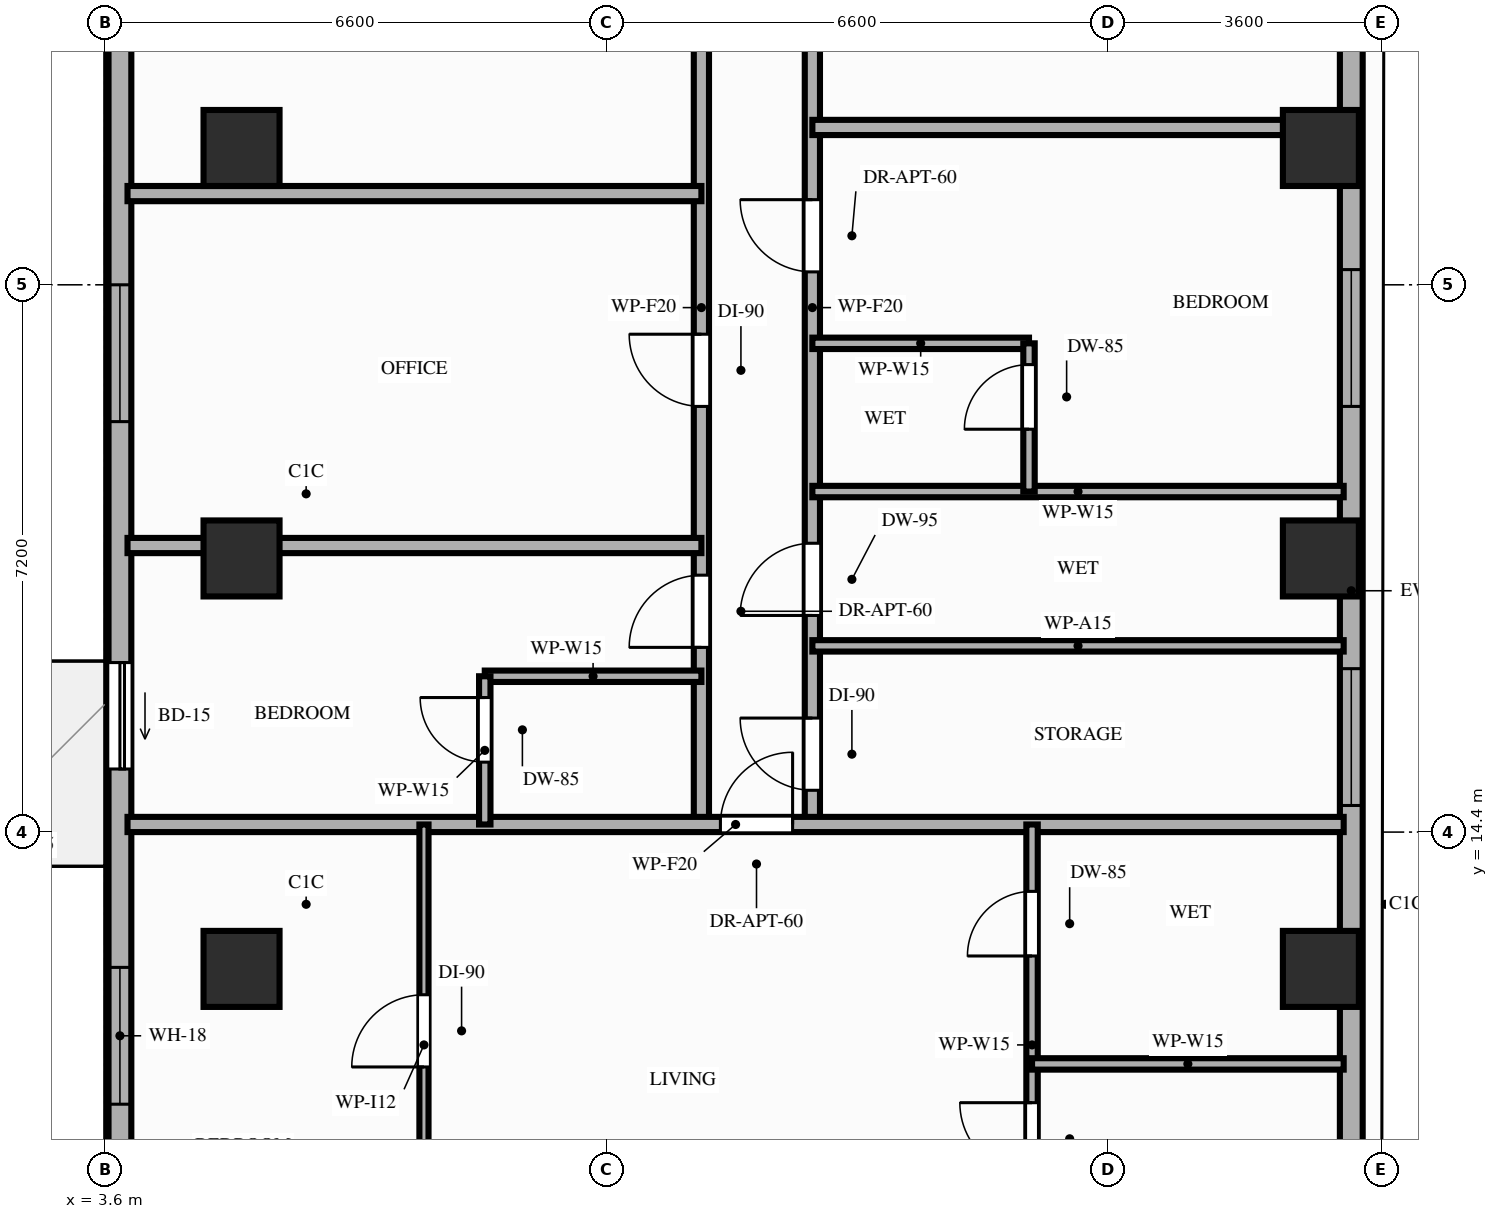
"""IFC4 building model, lengths in metres.
Left out: names, types, materials, properties, quantities, classifications, styles, units other than length and angle.
Written with IfcOpenShell. Run it as: python <this file> out.ifc"""

import sys

from ifc_helpers import new_model, si_unit, direction, frame, frame_2d, origin, origin_2d, place, context, subcontext, project, spatial, rectangle, extrude, element, fill, save


model = new_model("IFC4")
c1 = context("Model", 3, precision=1e-05, world=origin(), true_north=direction((0.0, 1.0)))
c2 = subcontext(c1, "Body", "Model", "MODEL_VIEW")
j1 = project(units=[si_unit("LENGTHUNIT", "METRE"), si_unit("PLANEANGLEUNIT", "RADIAN")], contexts=[c1])
p1 = place(None, origin())
s1 = spatial("IfcSite", under=j1, at=p1, CompositionType="ELEMENT")
p2 = place(p1, origin())
s2 = spatial("IfcBuilding", under=s1, at=p2, CompositionType="ELEMENT")
p3 = place(p2, frame((0.0, 0.0, 107.4)))
s3 = spatial("IfcBuildingStorey", under=s2, at=p3, CompositionType="ELEMENT", Elevation=107.4)
for number, where, z_axis, x_axis in (
    (1, (5.4, 12.6, 0.0), (0.0, 0.0, 1.0), (1.0, 0.0, 0.0)),
    (2, (19.6, 12.6, 0.0), (0.0, 0.0, 1.0), (1.0, 0.0, 0.0)),
    (3, (5.4, 18.0, 0.0), (0.0, 0.0, 1.0), (1.0, 0.0, 0.0)),
    (4, (19.6, 18.0, 0.0), (0.0, 0.0, 1.0), (1.0, 0.0, 0.0)),
    (5, (5.4, 23.4, 0.0), (0.0, 0.0, 1.0), (1.0, 0.0, 0.0)),
    (6, (19.6, 23.4, 0.0), (0.0, 0.0, 1.0), (1.0, 0.0, 0.0)),
):
    element("IfcColumn", number, at=place(p3, frame(where, z_axis=z_axis, x_axis=x_axis)), inside=s3, PredefinedType="COLUMN", context=c2, shape_type="SweptSolid", body=[
        extrude(rectangle(XDim=1.0, YDim=1.0, at=origin_2d()), origin(), (0.0, 0.0, 1.0), 3.2),
    ])
p4 = place(p3, frame((3.8, 42.1, 0.0), z_axis=(0.0, 0.0, 1.0), x_axis=(0.0, -1.0, 0.0)))
e7 = element("IfcWall", 7, at=p4, inside=s3, PredefinedType="STANDARD", context=c2, shape_type="SweptSolid", body=[
    extrude(rectangle(XDim=33.3, YDim=0.3, at=frame_2d((16.65, 0.0))), origin(), (0.0, 0.0, 1.0), 2.71),
])
p5 = place(p4, frame((25.47, 0.0, 0.0)))
e8 = element("IfcOpeningElement", 8, at=p5, cuts=e7, PredefinedType="OPENING", context=c2, shape_type="SweptSolid", body=[
    extrude(rectangle(XDim=1.4, YDim=2.1, at=frame_2d((0.7, 1.05))), frame((0.0, 0.16, 0.0), z_axis=(0.0, -1.0, 0.0), x_axis=(1.0, 0.0, 0.0)), (0.0, 0.0, 1.0), 0.32),
])
p6 = place(p4, frame((15.3, 0.0, 0.0)))
e9 = element("IfcOpeningElement", 9, at=p6, cuts=e7, PredefinedType="OPENING", context=c2, shape_type="SweptSolid", body=[
    extrude(rectangle(XDim=1.4, YDim=2.1, at=frame_2d((0.7, 1.05))), frame((0.0, 0.16, 0.0), z_axis=(0.0, -1.0, 0.0), x_axis=(1.0, 0.0, 0.0)), (0.0, 0.0, 1.0), 0.32),
])
p7 = place(p4, frame((29.48, 0.0, 0.85)))
e10 = element("IfcOpeningElement", 10, at=p7, cuts=e7, PredefinedType="OPENING", context=c2, shape_type="SweptSolid", body=[
    extrude(rectangle(XDim=1.8, YDim=1.61, at=frame_2d((0.9, 0.805))), frame((0.0, 0.16, 0.0), z_axis=(0.0, -1.0, 0.0), x_axis=(1.0, 0.0, 0.0)), (0.0, 0.0, 1.0), 0.32),
])
p8 = place(p4, frame((20.5, 0.0, 0.85)))
e11 = element("IfcOpeningElement", 11, at=p8, cuts=e7, PredefinedType="OPENING", context=c2, shape_type="SweptSolid", body=[
    extrude(rectangle(XDim=1.8, YDim=1.61, at=frame_2d((0.9, 0.805))), frame((0.0, 0.16, 0.0), z_axis=(0.0, -1.0, 0.0), x_axis=(1.0, 0.0, 0.0)), (0.0, 0.0, 1.0), 0.32),
])
p9 = place(p4, frame((9.9, 0.0, 0.85)))
e12 = element("IfcOpeningElement", 12, at=p9, cuts=e7, PredefinedType="OPENING", context=c2, shape_type="SweptSolid", body=[
    extrude(rectangle(XDim=1.8, YDim=1.61, at=frame_2d((0.9, 0.805))), frame((0.0, 0.16, 0.0), z_axis=(0.0, -1.0, 0.0), x_axis=(1.0, 0.0, 0.0)), (0.0, 0.0, 1.0), 0.32),
])
p10 = place(p4, frame((3.8, 0.0, 0.85)))
e13 = element("IfcOpeningElement", 13, at=p10, cuts=e7, PredefinedType="OPENING", context=c2, shape_type="SweptSolid", body=[
    extrude(rectangle(XDim=1.8, YDim=1.61, at=frame_2d((0.9, 0.805))), frame((0.0, 0.16, 0.0), z_axis=(0.0, -1.0, 0.0), x_axis=(1.0, 0.0, 0.0)), (0.0, 0.0, 1.0), 0.32),
])
p11 = place(p3, frame((20.0, 8.8, 0.0), z_axis=(0.0, 0.0, 1.0), x_axis=(0.0, 1.0, 0.0)))
e14 = element("IfcWall", 14, at=p11, inside=s3, PredefinedType="STANDARD", context=c2, shape_type="SweptSolid", body=[
    extrude(rectangle(XDim=17.55, YDim=0.3, at=frame_2d((8.775, 0.0))), origin(), (0.0, 0.0, 1.0), 2.41),
])
p12 = place(p11, frame((11.2, 0.0, 0.85)))
e15 = element("IfcOpeningElement", 15, at=p12, cuts=e14, PredefinedType="OPENING", context=c2, shape_type="SweptSolid", body=[
    extrude(rectangle(XDim=1.8, YDim=1.31, at=frame_2d((0.9, 0.655))), frame((0.0, 0.16, 0.0), z_axis=(0.0, -1.0, 0.0), x_axis=(1.0, 0.0, 0.0)), (0.0, 0.0, 1.0), 0.32),
])
p13 = place(p11, frame((5.95, 0.0, 0.85)))
e16 = element("IfcOpeningElement", 16, at=p13, cuts=e14, PredefinedType="OPENING", context=c2, shape_type="SweptSolid", body=[
    extrude(rectangle(XDim=1.8, YDim=1.31, at=frame_2d((0.9, 0.655))), frame((0.0, 0.16, 0.0), z_axis=(0.0, -1.0, 0.0), x_axis=(1.0, 0.0, 0.0)), (0.0, 0.0, 1.0), 0.32),
])
p14 = place(p3, frame((11.45, 14.5, 0.0), z_axis=(0.0, 0.0, 1.0), x_axis=(0.0, 1.0, 0.0)))
e17 = element("IfcWall", 17, at=p14, inside=s3, PredefinedType="PARTITIONING", context=c2, shape_type="SweptSolid", body=[
    extrude(rectangle(XDim=13.6, YDim=0.2, at=frame_2d((6.8, 0.0))), origin(), (0.0, 0.0, 1.0), 2.41),
])
p15 = place(p14, frame((2.33, 0.0, 0.0)))
e18 = element("IfcOpeningElement", 18, at=p15, cuts=e17, PredefinedType="OPENING", context=c2, shape_type="SweptSolid", body=[
    extrude(rectangle(XDim=0.95, YDim=2.15, at=frame_2d((0.475, 1.075))), frame((0.0, 0.11, 0.0), z_axis=(0.0, -1.0, 0.0), x_axis=(1.0, 0.0, 0.0)), (0.0, 0.0, 1.0), 0.22),
])
p16 = place(p14, frame((5.5, 0.0, 0.0)))
e19 = element("IfcOpeningElement", 19, at=p16, cuts=e17, PredefinedType="OPENING", context=c2, shape_type="SweptSolid", body=[
    extrude(rectangle(XDim=0.95, YDim=2.15, at=frame_2d((0.475, 1.075))), frame((0.0, 0.11, 0.0), z_axis=(0.0, -1.0, 0.0), x_axis=(1.0, 0.0, 0.0)), (0.0, 0.0, 1.0), 0.22),
])
p17 = place(p14, frame((10.47, 0.0, 0.0)))
e20 = element("IfcOpeningElement", 20, at=p17, cuts=e17, PredefinedType="OPENING", context=c2, shape_type="SweptSolid", body=[
    extrude(rectangle(XDim=0.95, YDim=2.15, at=frame_2d((0.475, 1.075))), frame((0.0, 0.11, 0.0), z_axis=(0.0, -1.0, 0.0), x_axis=(1.0, 0.0, 0.0)), (0.0, 0.0, 1.0), 0.22),
])
p18 = place(p3, frame((12.91, 14.5, 0.0), z_axis=(0.0, 0.0, 1.0), x_axis=(0.0, 1.0, 0.0)))
e21 = element("IfcWall", 21, at=p18, inside=s3, PredefinedType="PARTITIONING", context=c2, shape_type="SweptSolid", body=[
    extrude(rectangle(XDim=13.6, YDim=0.2, at=frame_2d((6.8, 0.0))), origin(), (0.0, 0.0, 1.0), 2.41),
])
p19 = place(p18, frame((0.45, 0.0, 0.0)))
e22 = element("IfcOpeningElement", 22, at=p19, cuts=e21, PredefinedType="OPENING", context=c2, shape_type="SweptSolid", body=[
    extrude(rectangle(XDim=0.95, YDim=2.15, at=frame_2d((0.475, 1.075))), frame((0.0, 0.11, 0.0), z_axis=(0.0, -1.0, 0.0), x_axis=(1.0, 0.0, 0.0)), (0.0, 0.0, 1.0), 0.22),
])
p20 = place(p18, frame((2.75, 0.0, 0.0)))
e23 = element("IfcOpeningElement", 23, at=p20, cuts=e21, PredefinedType="OPENING", context=c2, shape_type="SweptSolid", body=[
    extrude(rectangle(XDim=0.95, YDim=2.1, at=frame_2d((0.475, 1.05))), frame((0.0, 0.11, 0.0), z_axis=(0.0, -1.0, 0.0), x_axis=(1.0, 0.0, 0.0)), (0.0, 0.0, 1.0), 0.22),
])
p21 = place(p18, frame((10.91, 0.0, 0.0)))
e24 = element("IfcOpeningElement", 24, at=p21, cuts=e21, PredefinedType="OPENING", context=c2, shape_type="SweptSolid", body=[
    extrude(rectangle(XDim=0.95, YDim=2.15, at=frame_2d((0.475, 1.075))), frame((0.0, 0.11, 0.0), z_axis=(0.0, -1.0, 0.0), x_axis=(1.0, 0.0, 0.0)), (0.0, 0.0, 1.0), 0.22),
])
p22 = place(p18, frame((7.27, 0.0, 0.0)))
e25 = element("IfcOpeningElement", 25, at=p22, cuts=e21, PredefinedType="OPENING", context=c2, shape_type="SweptSolid", body=[
    extrude(rectangle(XDim=0.95, YDim=2.15, at=frame_2d((0.475, 1.075))), frame((0.0, 0.11, 0.0), z_axis=(0.0, -1.0, 0.0), x_axis=(1.0, 0.0, 0.0)), (0.0, 0.0, 1.0), 0.22),
])
p23 = place(p3, frame((3.9, 14.5, 0.0), z_axis=(0.0, 0.0, 1.0), x_axis=(1.0, 0.0, 0.0)))
e26 = element("IfcWall", 26, at=p23, inside=s3, PredefinedType="PARTITIONING", context=c2, shape_type="SweptSolid", body=[
    extrude(rectangle(XDim=16.0, YDim=0.2, at=frame_2d((8.0, 0.0))), origin(), (0.0, 0.0, 1.0), 2.41),
])
p24 = place(p23, frame((7.8, 0.0, 0.0)))
e27 = element("IfcOpeningElement", 27, at=p24, cuts=e26, PredefinedType="OPENING", context=c2, shape_type="SweptSolid", body=[
    extrude(rectangle(XDim=0.95, YDim=2.15, at=frame_2d((0.475, 1.075))), frame((0.0, 0.11, 0.0), z_axis=(0.0, -1.0, 0.0), x_axis=(1.0, 0.0, 0.0)), (0.0, 0.0, 1.0), 0.22),
])
p25 = place(p3, frame((8.6, 16.45, 0.0), z_axis=(0.0, 0.0, 1.0), x_axis=(1.0, 0.0, 0.0)))
e28 = element("IfcWall", 28, at=p25, inside=s3, PredefinedType="PARTITIONING", context=c2, shape_type="SweptSolid", body=[
    extrude(rectangle(XDim=2.85, YDim=0.15, at=frame_2d((1.425, 0.0))), origin(), (0.0, 0.0, 1.0), 2.6),
])
p26 = place(p3, frame((8.6, 14.5, 0.0), z_axis=(0.0, 0.0, 1.0), x_axis=(0.0, 1.0, 0.0)))
e29 = element("IfcWall", 29, at=p26, inside=s3, PredefinedType="PARTITIONING", context=c2, shape_type="SweptSolid", body=[
    extrude(rectangle(XDim=1.95, YDim=0.15, at=frame_2d((0.975, 0.0))), origin(), (0.0, 0.0, 1.0), 2.6),
])
p27 = place(p26, frame((0.82, 0.0, 0.0)))
e30 = element("IfcOpeningElement", 30, at=p27, cuts=e29, PredefinedType="OPENING", context=c2, shape_type="SweptSolid", body=[
    extrude(rectangle(XDim=0.85, YDim=2.1, at=frame_2d((0.425, 1.05))), frame((0.0, 0.085, 0.0), z_axis=(0.0, -1.0, 0.0), x_axis=(1.0, 0.0, 0.0)), (0.0, 0.0, 1.0), 0.17),
])
for number, where, z_axis, x_axis in (
    (31, (3.9, 18.17, 0.0), (0.0, 0.0, 1.0), (1.0, 0.0, 0.0)),
    (32, (3.9, 22.8, 0.0), (0.0, 0.0, 1.0), (1.0, 0.0, 0.0)),
):
    element("IfcWall", number, at=place(p3, frame(where, z_axis=z_axis, x_axis=x_axis)), inside=s3, PredefinedType="PARTITIONING", context=c2, shape_type="SweptSolid", body=[
        extrude(rectangle(XDim=7.55, YDim=0.2, at=frame_2d((3.775, 0.0))), origin(), (0.0, 0.0, 1.0), 2.41),
    ])
p28 = place(p3, frame((7.8, 8.7, 0.0), z_axis=(0.0, 0.0, 1.0), x_axis=(0.0, 1.0, 0.0)))
e33 = element("IfcWall", 33, at=p28, inside=s3, PredefinedType="PARTITIONING", context=c2, shape_type="SweptSolid", body=[
    extrude(rectangle(XDim=5.8, YDim=0.12, at=frame_2d((2.9, 0.0))), origin(), (0.0, 0.0, 1.0), 2.41),
])
p29 = place(p28, frame((2.61, 0.0, 0.0)))
e34 = element("IfcOpeningElement", 34, at=p29, cuts=e33, PredefinedType="OPENING", context=c2, shape_type="SweptSolid", body=[
    extrude(rectangle(XDim=0.95, YDim=2.15, at=frame_2d((0.475, 1.075))), frame((0.0, 0.07, 0.0), z_axis=(0.0, -1.0, 0.0), x_axis=(1.0, 0.0, 0.0)), (0.0, 0.0, 1.0), 0.14),
])
p30 = place(p3, frame((15.8, 8.7, 0.0), z_axis=(0.0, 0.0, 1.0), x_axis=(0.0, 1.0, 0.0)))
e35 = element("IfcWall", 35, at=p30, inside=s3, PredefinedType="PARTITIONING", context=c2, shape_type="SweptSolid", body=[
    extrude(rectangle(XDim=5.8, YDim=0.15, at=frame_2d((2.9, 0.0))), origin(), (0.0, 0.0, 1.0), 2.41),
])
p31 = place(p30, frame((1.19, 0.0, 0.0)))
e36 = element("IfcOpeningElement", 36, at=p31, cuts=e35, PredefinedType="OPENING", context=c2, shape_type="SweptSolid", body=[
    extrude(rectangle(XDim=0.95, YDim=2.15, at=frame_2d((0.475, 1.075))), frame((0.0, 0.085, 0.0), z_axis=(0.0, -1.0, 0.0), x_axis=(1.0, 0.0, 0.0)), (0.0, 0.0, 1.0), 0.17),
])
p32 = place(p30, frame((4.07, 0.0, 0.0)))
e37 = element("IfcOpeningElement", 37, at=p32, cuts=e35, PredefinedType="OPENING", context=c2, shape_type="SweptSolid", body=[
    extrude(rectangle(XDim=0.85, YDim=2.1, at=frame_2d((0.425, 1.05))), frame((0.0, 0.085, 0.0), z_axis=(0.0, -1.0, 0.0), x_axis=(1.0, 0.0, 0.0)), (0.0, 0.0, 1.0), 0.17),
])
p33 = place(p3, frame((15.8, 11.35, 0.0), z_axis=(0.0, 0.0, 1.0), x_axis=(1.0, 0.0, 0.0)))
e38 = element("IfcWall", 38, at=p33, inside=s3, PredefinedType="PARTITIONING", context=c2, shape_type="SweptSolid", body=[
    extrude(rectangle(XDim=4.1, YDim=0.15, at=frame_2d((2.05, 0.0))), origin(), (0.0, 0.0, 1.0), 3.02),
])
for number, where, z_axis, x_axis in (
    (39, (12.91, 16.85, 0.0), (0.0, 0.0, 1.0), (1.0, 0.0, 0.0)),
    (40, (12.91, 18.88, 0.0), (0.0, 0.0, 1.0), (1.0, 0.0, 0.0)),
):
    element("IfcWall", number, at=place(p3, frame(where, z_axis=z_axis, x_axis=x_axis)), inside=s3, PredefinedType="PARTITIONING", context=c2, shape_type="SweptSolid", body=[
        extrude(rectangle(XDim=6.99, YDim=0.15, at=frame_2d((3.495, 0.0))), origin(), (0.0, 0.0, 1.0), 2.41),
    ])
p34 = place(p3, frame((12.91, 23.67, 0.0), z_axis=(0.0, 0.0, 1.0), x_axis=(1.0, 0.0, 0.0)))
e41 = element("IfcWall", 41, at=p34, inside=s3, PredefinedType="PARTITIONING", context=c2, shape_type="SweptSolid", body=[
    extrude(rectangle(XDim=6.99, YDim=0.2, at=frame_2d((3.495, 0.0))), origin(), (0.0, 0.0, 1.0), 2.41),
])
p35 = place(p3, frame((12.91, 20.83, 0.0), z_axis=(0.0, 0.0, 1.0), x_axis=(1.0, 0.0, 0.0)))
e42 = element("IfcWall", 42, at=p35, inside=s3, PredefinedType="PARTITIONING", context=c2, shape_type="SweptSolid", body=[
    extrude(rectangle(XDim=2.85, YDim=0.15, at=frame_2d((1.425, 0.0))), origin(), (0.0, 0.0, 1.0), 3.02),
])
p36 = place(p3, frame((15.76, 18.88, 0.0), z_axis=(0.0, 0.0, 1.0), x_axis=(0.0, 1.0, 0.0)))
e43 = element("IfcWall", 43, at=p36, inside=s3, PredefinedType="PARTITIONING", context=c2, shape_type="SweptSolid", body=[
    extrude(rectangle(XDim=1.95, YDim=0.15, at=frame_2d((0.975, 0.0))), origin(), (0.0, 0.0, 1.0), 2.71),
])
p37 = place(p36, frame((0.82, 0.0, 0.0)))
e44 = element("IfcOpeningElement", 44, at=p37, cuts=e43, PredefinedType="OPENING", context=c2, shape_type="SweptSolid", body=[
    extrude(rectangle(XDim=0.85, YDim=2.1, at=frame_2d((0.425, 1.05))), frame((0.0, 0.085, 0.0), z_axis=(0.0, -1.0, 0.0), x_axis=(1.0, 0.0, 0.0)), (0.0, 0.0, 1.0), 0.17),
])
p38 = place(p5, origin())
e45 = element("IfcDoor", 45, at=p38, inside=s3, OperationType="SLIDING_TO_RIGHT", PredefinedType="DOOR", context=c2, shape_type="SweptSolid", body=[
    extrude(rectangle(XDim=1.4, YDim=2.1, at=frame_2d((0.7, 1.05))), frame((0.0, 0.025, 0.0), z_axis=(0.0, -1.0, 0.0), x_axis=(1.0, 0.0, 0.0)), (0.0, 0.0, 1.0), 0.05),
])
fill(e8, e45)
p39 = place(p7, origin())
e46 = element("IfcWindow", 46, at=p39, inside=s3, PartitioningType="SINGLE_PANEL", PredefinedType="WINDOW", context=c2, shape_type="SweptSolid", body=[
    extrude(rectangle(XDim=1.8, YDim=1.61, at=frame_2d((0.9, 0.805))), frame((0.0, 0.03, 0.0), z_axis=(0.0, -1.0, 0.0), x_axis=(1.0, 0.0, 0.0)), (0.0, 0.0, 1.0), 0.06),
])
fill(e10, e46)
p40 = place(p12, origin())
e47 = element("IfcWindow", 47, at=p40, inside=s3, PartitioningType="SINGLE_PANEL", PredefinedType="WINDOW", context=c2, shape_type="SweptSolid", body=[
    extrude(rectangle(XDim=1.8, YDim=1.31, at=frame_2d((0.9, 0.655))), frame((0.0, 0.03, 0.0), z_axis=(0.0, -1.0, 0.0), x_axis=(1.0, 0.0, 0.0)), (0.0, 0.0, 1.0), 0.06),
])
fill(e15, e47)
p41 = place(p8, origin())
e48 = element("IfcWindow", 48, at=p41, inside=s3, PartitioningType="SINGLE_PANEL", PredefinedType="WINDOW", context=c2, shape_type="SweptSolid", body=[
    extrude(rectangle(XDim=1.8, YDim=1.61, at=frame_2d((0.9, 0.805))), frame((0.0, 0.03, 0.0), z_axis=(0.0, -1.0, 0.0), x_axis=(1.0, 0.0, 0.0)), (0.0, 0.0, 1.0), 0.06),
])
fill(e11, e48)
p42 = place(p13, origin())
e49 = element("IfcWindow", 49, at=p42, inside=s3, PartitioningType="SINGLE_PANEL", PredefinedType="WINDOW", context=c2, shape_type="SweptSolid", body=[
    extrude(rectangle(XDim=1.8, YDim=1.31, at=frame_2d((0.9, 0.655))), frame((0.0, 0.03, 0.0), z_axis=(0.0, -1.0, 0.0), x_axis=(1.0, 0.0, 0.0)), (0.0, 0.0, 1.0), 0.06),
])
fill(e16, e49)
p43 = place(p27, origin())
e50 = element("IfcDoor", 50, at=p43, inside=s3, OperationType="SINGLE_SWING_RIGHT", PredefinedType="DOOR", context=c2, shape_type="SweptSolid", body=[
    extrude(rectangle(XDim=0.85, YDim=2.1, at=frame_2d((0.425, 1.05))), frame((0.0, 0.025, 0.0), z_axis=(0.0, -1.0, 0.0), x_axis=(1.0, 0.0, 0.0)), (0.0, 0.0, 1.0), 0.05),
])
fill(e30, e50)
p44 = place(p15, origin())
e51 = element("IfcDoor", 51, at=p44, inside=s3, OperationType="SINGLE_SWING_LEFT", PredefinedType="DOOR", context=c2, shape_type="SweptSolid", body=[
    extrude(rectangle(XDim=0.95, YDim=2.15, at=frame_2d((0.475, 1.075))), frame((0.0, 0.025, 0.0), z_axis=(0.0, -1.0, 0.0), x_axis=(1.0, 0.0, 0.0)), (0.0, 0.0, 1.0), 0.05),
])
fill(e18, e51)
p45 = place(p16, origin())
e52 = element("IfcDoor", 52, at=p45, inside=s3, OperationType="SINGLE_SWING_RIGHT", PredefinedType="DOOR", context=c2, shape_type="SweptSolid", body=[
    extrude(rectangle(XDim=0.95, YDim=2.15, at=frame_2d((0.475, 1.075))), frame((0.0, 0.025, 0.0), z_axis=(0.0, -1.0, 0.0), x_axis=(1.0, 0.0, 0.0)), (0.0, 0.0, 1.0), 0.05),
])
fill(e19, e52)
p46 = place(p24, origin())
e53 = element("IfcDoor", 53, at=p46, inside=s3, OperationType="SINGLE_SWING_RIGHT", PredefinedType="DOOR", context=c2, shape_type="SweptSolid", body=[
    extrude(rectangle(XDim=0.95, YDim=2.15, at=frame_2d((0.475, 1.075))), frame((0.0, 0.025, 0.0), z_axis=(0.0, -1.0, 0.0), x_axis=(1.0, 0.0, 0.0)), (0.0, 0.0, 1.0), 0.05),
])
fill(e27, e53)
p47 = place(p29, origin())
e54 = element("IfcDoor", 54, at=p47, inside=s3, OperationType="SINGLE_SWING_LEFT", PredefinedType="DOOR", context=c2, shape_type="SweptSolid", body=[
    extrude(rectangle(XDim=0.95, YDim=2.15, at=frame_2d((0.475, 1.075))), frame((0.0, 0.025, 0.0), z_axis=(0.0, -1.0, 0.0), x_axis=(1.0, 0.0, 0.0)), (0.0, 0.0, 1.0), 0.05),
])
fill(e34, e54)
p48 = place(p31, origin())
e55 = element("IfcDoor", 55, at=p48, inside=s3, OperationType="SINGLE_SWING_RIGHT", PredefinedType="DOOR", context=c2, shape_type="SweptSolid", body=[
    extrude(rectangle(XDim=0.95, YDim=2.15, at=frame_2d((0.475, 1.075))), frame((0.0, 0.025, 0.0), z_axis=(0.0, -1.0, 0.0), x_axis=(1.0, 0.0, 0.0)), (0.0, 0.0, 1.0), 0.05),
])
fill(e36, e55)
p49 = place(p32, origin())
e56 = element("IfcDoor", 56, at=p49, inside=s3, OperationType="SINGLE_SWING_LEFT", PredefinedType="DOOR", context=c2, shape_type="SweptSolid", body=[
    extrude(rectangle(XDim=0.85, YDim=2.1, at=frame_2d((0.425, 1.05))), frame((0.0, 0.025, 0.0), z_axis=(0.0, -1.0, 0.0), x_axis=(1.0, 0.0, 0.0)), (0.0, 0.0, 1.0), 0.05),
])
fill(e37, e56)
p50 = place(p19, origin())
e57 = element("IfcDoor", 57, at=p50, inside=s3, OperationType="SINGLE_SWING_RIGHT", PredefinedType="DOOR", context=c2, shape_type="SweptSolid", body=[
    extrude(rectangle(XDim=0.95, YDim=2.15, at=frame_2d((0.475, 1.075))), frame((0.0, 0.025, 0.0), z_axis=(0.0, -1.0, 0.0), x_axis=(1.0, 0.0, 0.0)), (0.0, 0.0, 1.0), 0.05),
])
fill(e22, e57)
p51 = place(p20, origin())
e58 = element("IfcDoor", 58, at=p51, inside=s3, OperationType="SINGLE_SWING_LEFT", PredefinedType="DOOR", context=c2, shape_type="SweptSolid", body=[
    extrude(rectangle(XDim=0.95, YDim=2.1, at=frame_2d((0.475, 1.05))), frame((0.0, 0.025, 0.0), z_axis=(0.0, -1.0, 0.0), x_axis=(1.0, 0.0, 0.0)), (0.0, 0.0, 1.0), 0.05),
])
fill(e23, e58)
p52 = place(p37, origin())
e59 = element("IfcDoor", 59, at=p52, inside=s3, OperationType="SINGLE_SWING_LEFT", PredefinedType="DOOR", context=c2, shape_type="SweptSolid", body=[
    extrude(rectangle(XDim=0.85, YDim=2.1, at=frame_2d((0.425, 1.05))), frame((0.0, 0.025, 0.0), z_axis=(0.0, -1.0, 0.0), x_axis=(1.0, 0.0, 0.0)), (0.0, 0.0, 1.0), 0.05),
])
fill(e44, e59)
p53 = place(p22, origin())
e60 = element("IfcDoor", 60, at=p53, inside=s3, OperationType="SINGLE_SWING_RIGHT", PredefinedType="DOOR", context=c2, shape_type="SweptSolid", body=[
    extrude(rectangle(XDim=0.95, YDim=2.15, at=frame_2d((0.475, 1.075))), frame((0.0, 0.025, 0.0), z_axis=(0.0, -1.0, 0.0), x_axis=(1.0, 0.0, 0.0)), (0.0, 0.0, 1.0), 0.05),
])
fill(e25, e60)
save(model, sys.argv[1])
